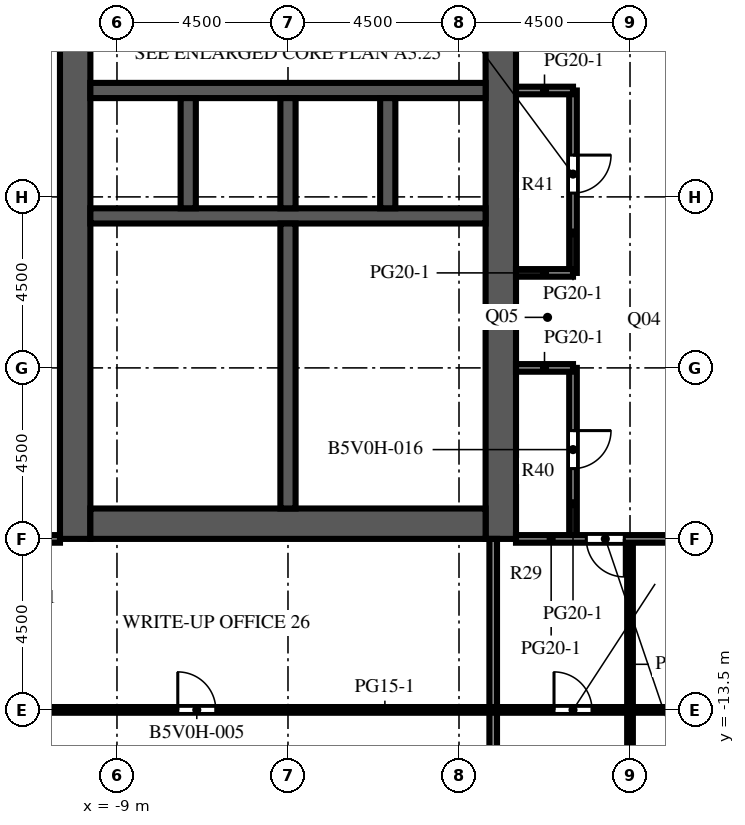
"""IFC4 building model, lengths in metres.
Left out: names, types, materials, properties, quantities, classifications, styles, units other than length and angle.
Written with IfcOpenShell. Run it as: python <this file> out.ifc"""

import sys

from ifc_helpers import new_model, si_unit, direction, frame, frame_2d, origin, place, context, subcontext, project, spatial, rectangle, extrude, element, fill, save


model = new_model("IFC4")
c1 = context("Model", 3, precision=1e-05, world=origin(), true_north=direction((0.0, 1.0)))
c2 = subcontext(c1, "Body", "Model", "MODEL_VIEW")
j1 = project(units=[si_unit("LENGTHUNIT", "METRE"), si_unit("PLANEANGLEUNIT", "RADIAN")], contexts=[c1])
p1 = place(None, origin())
s1 = spatial("IfcSite", under=j1, at=p1, CompositionType="ELEMENT")
p2 = place(p1, origin())
s2 = spatial("IfcBuilding", under=s1, at=p2, CompositionType="ELEMENT")
p3 = place(p2, frame((0.0, 0.0, 156.8)))
s3 = spatial("IfcBuildingStorey", under=s2, at=p3, CompositionType="ELEMENT", Elevation=156.8)
p4 = place(p3, frame((-10.1, -9.0, 0.0), z_axis=(0.0, 0.0, 1.0), x_axis=(0.0, 1.0, 0.0)))
e1 = element("IfcWall", 1, at=p4, inside=s3, PredefinedType="SHEAR", context=c2, shape_type="SweptSolid", body=[
    extrude(rectangle(XDim=27.5, YDim=0.8, at=frame_2d((13.75, 0.0))), origin(), (0.0, 0.0, 1.0), 4.1),
])
p5 = place(p4, frame((12.55, 0.0, 0.0)))
e2 = element("IfcOpeningElement", 2, at=p5, cuts=e1, PredefinedType="OPENING", context=c2, shape_type="SweptSolid", body=[
    extrude(rectangle(XDim=2.4, YDim=2.4, at=frame_2d((1.2, 1.2))), frame((0.0, 0.41, 0.0), z_axis=(0.0, -1.0, 0.0), x_axis=(1.0, 0.0, 0.0)), (0.0, 0.0, 1.0), 0.82),
])
p6 = place(p4, frame((6.825, 0.0, 0.0)))
e3 = element("IfcOpeningElement", 3, at=p6, cuts=e1, PredefinedType="OPENING", context=c2, shape_type="SweptSolid", body=[
    extrude(rectangle(XDim=1.2, YDim=2.1, at=frame_2d((0.6, 1.05))), frame((0.0, 0.41, 0.0), z_axis=(0.0, -1.0, 0.0), x_axis=(1.0, 0.0, 0.0)), (0.0, 0.0, 1.0), 0.82),
])
p7 = place(p4, frame((19.475, 0.0, 0.0)))
e4 = element("IfcOpeningElement", 4, at=p7, cuts=e1, PredefinedType="OPENING", context=c2, shape_type="SweptSolid", body=[
    extrude(rectangle(XDim=1.2, YDim=2.1, at=frame_2d((0.6, 1.05))), frame((0.0, 0.41, 0.0), z_axis=(0.0, -1.0, 0.0), x_axis=(1.0, 0.0, 0.0)), (0.0, 0.0, 1.0), 0.82),
])
p8 = place(p3, frame((1.1, -9.0, 0.0), z_axis=(0.0, 0.0, 1.0), x_axis=(0.0, 1.0, 0.0)))
e5 = element("IfcWall", 5, at=p8, inside=s3, PredefinedType="SHEAR", context=c2, shape_type="SweptSolid", body=[
    extrude(rectangle(XDim=27.5, YDim=0.8, at=frame_2d((13.75, 0.0))), origin(), (0.0, 0.0, 1.0), 4.1),
])
p9 = place(p8, frame((12.55, 0.0, 0.0)))
e6 = element("IfcOpeningElement", 6, at=p9, cuts=e5, PredefinedType="OPENING", context=c2, shape_type="SweptSolid", body=[
    extrude(rectangle(XDim=2.4, YDim=2.4, at=frame_2d((1.2, 1.2))), frame((0.0, 0.41, 0.0), z_axis=(0.0, -1.0, 0.0), x_axis=(1.0, 0.0, 0.0)), (0.0, 0.0, 1.0), 0.82),
])
p10 = place(p8, frame((5.45, 0.0, 0.0)))
e7 = element("IfcOpeningElement", 7, at=p10, cuts=e5, PredefinedType="OPENING", context=c2, shape_type="SweptSolid", body=[
    extrude(rectangle(XDim=1.2, YDim=2.1, at=frame_2d((0.6, 1.05))), frame((0.0, 0.41, 0.0), z_axis=(0.0, -1.0, 0.0), x_axis=(1.0, 0.0, 0.0)), (0.0, 0.0, 1.0), 0.82),
])
p11 = place(p8, frame((19.45, 0.0, 0.0)))
e8 = element("IfcOpeningElement", 8, at=p11, cuts=e5, PredefinedType="OPENING", context=c2, shape_type="SweptSolid", body=[
    extrude(rectangle(XDim=1.0, YDim=2.1, at=frame_2d((0.5, 1.05))), frame((0.0, 0.41, 0.0), z_axis=(0.0, -1.0, 0.0), x_axis=(1.0, 0.0, 0.0)), (0.0, 0.0, 1.0), 0.82),
])
p12 = place(p8, frame((21.137, 0.0, 0.0)))
e9 = element("IfcOpeningElement", 9, at=p12, cuts=e5, PredefinedType="OPENING", context=c2, shape_type="SweptSolid", body=[
    extrude(rectangle(XDim=1.0, YDim=2.1, at=frame_2d((0.5, 1.05))), frame((0.0, 0.41, 0.0), z_axis=(0.0, -1.0, 0.0), x_axis=(1.0, 0.0, 0.0)), (0.0, 0.0, 1.0), 0.82),
])
p13 = place(p8, frame((23.2, 0.0, 0.0)))
e10 = element("IfcOpeningElement", 10, at=p13, cuts=e5, PredefinedType="OPENING", context=c2, shape_type="SweptSolid", body=[
    extrude(rectangle(XDim=1.0, YDim=2.1, at=frame_2d((0.5, 1.05))), frame((0.0, 0.41, 0.0), z_axis=(0.0, -1.0, 0.0), x_axis=(1.0, 0.0, 0.0)), (0.0, 0.0, 1.0), 0.82),
])
p14 = place(p8, frame((25.262, 0.0, 0.0)))
e11 = element("IfcOpeningElement", 11, at=p14, cuts=e5, PredefinedType="OPENING", context=c2, shape_type="SweptSolid", body=[
    extrude(rectangle(XDim=1.0, YDim=2.1, at=frame_2d((0.5, 1.05))), frame((0.0, 0.41, 0.0), z_axis=(0.0, -1.0, 0.0), x_axis=(1.0, 0.0, 0.0)), (0.0, 0.0, 1.0), 0.82),
])
p15 = place(p3, frame((-9.7, -8.6, 0.0), z_axis=(0.0, 0.0, 1.0), x_axis=(1.0, 0.0, 0.0)))
e12 = element("IfcWall", 12, at=p15, inside=s3, PredefinedType="SHEAR", context=c2, shape_type="SweptSolid", body=[
    extrude(rectangle(XDim=10.4, YDim=0.8, at=frame_2d((5.2, 0.0))), origin(), (0.0, 0.0, 1.0), 4.1),
])
p16 = place(p3, frame((-9.7, -0.5, 0.0), z_axis=(0.0, 0.0, 1.0), x_axis=(1.0, 0.0, 0.0)))
e13 = element("IfcWall", 13, at=p16, inside=s3, PredefinedType="SHEAR", context=c2, shape_type="SweptSolid", body=[
    extrude(rectangle(XDim=10.4, YDim=0.4, at=frame_2d((5.2, 0.0))), origin(), (0.0, 0.0, 1.0), 4.1),
])
p17 = place(p3, frame((-9.7, 2.8, 0.0), z_axis=(0.0, 0.0, 1.0), x_axis=(1.0, 0.0, 0.0)))
e14 = element("IfcWall", 14, at=p17, inside=s3, PredefinedType="SHEAR", context=c2, shape_type="SweptSolid", body=[
    extrude(rectangle(XDim=10.4, YDim=0.4, at=frame_2d((5.2, 0.0))), origin(), (0.0, 0.0, 1.0), 4.1),
])
p18 = place(p17, frame((0.738, 0.0, 0.0)))
e15 = element("IfcOpeningElement", 15, at=p18, cuts=e14, PredefinedType="OPENING", context=c2, shape_type="SweptSolid", body=[
    extrude(rectangle(XDim=1.1, YDim=2.1, at=frame_2d((0.55, 1.05))), frame((0.0, 0.21, 0.0), z_axis=(0.0, -1.0, 0.0), x_axis=(1.0, 0.0, 0.0)), (0.0, 0.0, 1.0), 0.42),
])
p19 = place(p17, frame((3.337, 0.0, 0.0)))
e16 = element("IfcOpeningElement", 16, at=p19, cuts=e14, PredefinedType="OPENING", context=c2, shape_type="SweptSolid", body=[
    extrude(rectangle(XDim=1.1, YDim=2.1, at=frame_2d((0.55, 1.05))), frame((0.0, 0.21, 0.0), z_axis=(0.0, -1.0, 0.0), x_axis=(1.0, 0.0, 0.0)), (0.0, 0.0, 1.0), 0.42),
])
p20 = place(p17, frame((6.012, 0.0, 0.0)))
e17 = element("IfcOpeningElement", 17, at=p20, cuts=e14, PredefinedType="OPENING", context=c2, shape_type="SweptSolid", body=[
    extrude(rectangle(XDim=1.0, YDim=2.1, at=frame_2d((0.5, 1.05))), frame((0.0, 0.21, 0.0), z_axis=(0.0, -1.0, 0.0), x_axis=(1.0, 0.0, 0.0)), (0.0, 0.0, 1.0), 0.42),
])
p21 = place(p17, frame((8.613, 0.0, 0.0)))
e18 = element("IfcOpeningElement", 18, at=p21, cuts=e14, PredefinedType="OPENING", context=c2, shape_type="SweptSolid", body=[
    extrude(rectangle(XDim=1.0, YDim=2.1, at=frame_2d((0.5, 1.05))), frame((0.0, 0.21, 0.0), z_axis=(0.0, -1.0, 0.0), x_axis=(1.0, 0.0, 0.0)), (0.0, 0.0, 1.0), 0.42),
])
for number, where, z_axis, x_axis in (
    (19, (-7.125, -0.3, 0.0), (0.0, 0.0, 1.0), (0.0, 1.0, 0.0)),
    (20, (-4.5, -0.3, 0.0), (0.0, 0.0, 1.0), (0.0, 1.0, 0.0)),
    (21, (-1.875, -0.3, 0.0), (0.0, 0.0, 1.0), (0.0, 1.0, 0.0)),
):
    element("IfcWall", number, at=place(p3, frame(where, z_axis=z_axis, x_axis=x_axis)), inside=s3, PredefinedType="SHEAR", context=c2, shape_type="SweptSolid", body=[
        extrude(rectangle(XDim=2.9, YDim=0.4, at=frame_2d((1.45, 0.0))), origin(), (0.0, 0.0, 1.0), 4.1),
    ])
p22 = place(p3, frame((-4.5, -8.2, 0.0), z_axis=(0.0, 0.0, 1.0), x_axis=(0.0, 1.0, 0.0)))
e22 = element("IfcWall", 22, at=p22, inside=s3, PredefinedType="SHEAR", context=c2, shape_type="SweptSolid", body=[
    extrude(rectangle(XDim=7.5, YDim=0.4, at=frame_2d((3.75, 0.0))), origin(), (0.0, 0.0, 1.0), 4.1),
])
p23 = place(p3, frame((-0.8, -5.2, 0.0), z_axis=(0.0, 0.0, 1.0), x_axis=(1.0, 0.0, 0.0)))
e23 = element("IfcWall", 23, at=p23, inside=s3, PredefinedType="PARTITIONING", context=c2, shape_type="SweptSolid", body=[
    extrude(rectangle(XDim=1.5, YDim=0.1, at=frame_2d((0.75, 0.0))), origin(), (0.0, 0.0, 1.0), 3.65),
])
p24 = place(p23, frame((0.25, 0.0, 0.0)))
e24 = element("IfcOpeningElement", 24, at=p24, cuts=e23, PredefinedType="OPENING", context=c2, shape_type="SweptSolid", body=[
    extrude(rectangle(XDim=1.0, YDim=2.1, at=frame_2d((0.5, 1.05))), frame((0.0, 0.06, 0.0), z_axis=(0.0, -1.0, 0.0), x_axis=(1.0, 0.0, 0.0)), (0.0, 0.0, 1.0), 0.12),
])
p25 = place(p3, frame((-0.8, -5.2, 0.0), z_axis=(0.0, 0.0, 1.0), x_axis=(0.0, 1.0, 0.0)))
e25 = element("IfcWall", 25, at=p25, inside=s3, PredefinedType="PARTITIONING", context=c2, shape_type="SweptSolid", body=[
    extrude(rectangle(XDim=2.25, YDim=0.1, at=frame_2d((1.125, 0.0))), origin(), (0.0, 0.0, 1.0), 3.65),
])
p26 = place(p25, frame((0.625, 0.0, 0.0)))
e26 = element("IfcOpeningElement", 26, at=p26, cuts=e25, PredefinedType="OPENING", context=c2, shape_type="SweptSolid", body=[
    extrude(rectangle(XDim=1.0, YDim=2.1, at=frame_2d((0.5, 1.05))), frame((0.0, 0.06, 0.0), z_axis=(0.0, -1.0, 0.0), x_axis=(1.0, 0.0, 0.0)), (0.0, 0.0, 1.0), 0.12),
])
p27 = place(p3, frame((-0.8, -2.95, 0.0), z_axis=(0.0, 0.0, 1.0), x_axis=(0.0, 1.0, 0.0)))
e27 = element("IfcWall", 27, at=p27, inside=s3, PredefinedType="PARTITIONING", context=c2, shape_type="SweptSolid", body=[
    extrude(rectangle(XDim=2.25, YDim=0.1, at=frame_2d((1.125, 0.0))), origin(), (0.0, 0.0, 1.0), 3.65),
])
p28 = place(p27, frame((0.625, 0.0, 0.0)))
e28 = element("IfcOpeningElement", 28, at=p28, cuts=e27, PredefinedType="OPENING", context=c2, shape_type="SweptSolid", body=[
    extrude(rectangle(XDim=1.0, YDim=2.1, at=frame_2d((0.5, 1.05))), frame((0.0, 0.06, 0.0), z_axis=(0.0, -1.0, 0.0), x_axis=(1.0, 0.0, 0.0)), (0.0, 0.0, 1.0), 0.12),
])
for number, where, z_axis, x_axis in (
    (29, (-4.3, -5.2, 0.0), (0.0, 0.0, 1.0), (1.0, 0.0, 0.0)),
    (30, (-4.3, -2.95, 0.0), (0.0, 0.0, 1.0), (1.0, 0.0, 0.0)),
):
    element("IfcWall", number, at=place(p3, frame(where, z_axis=z_axis, x_axis=x_axis)), inside=s3, PredefinedType="PARTITIONING", context=c2, shape_type="SweptSolid", body=[
        extrude(rectangle(XDim=3.5, YDim=0.1, at=frame_2d((1.75, 0.0))), origin(), (0.0, 0.0, 1.0), 3.65),
    ])
p29 = place(p3, frame((0.9, -26.85, 0.0), z_axis=(0.0, 0.0, 1.0), x_axis=(0.0, 1.0, 0.0)))
e31 = element("IfcWall", 31, at=p29, inside=s3, PredefinedType="PARTITIONING", context=c2, shape_type="SweptSolid", body=[
    extrude(rectangle(XDim=17.85, YDim=0.2, at=frame_2d((8.925, 0.0))), origin(), (0.0, 0.0, 1.0), 3.65),
])
p30 = place(p3, frame((3.0, -9.0, 0.0), z_axis=(0.0, 0.0, 1.0), x_axis=(0.0, 1.0, 0.0)))
e32 = element("IfcWall", 32, at=p30, inside=s3, PredefinedType="PARTITIONING", context=c2, shape_type="SweptSolid", body=[
    extrude(rectangle(XDim=4.5, YDim=0.2, at=frame_2d((2.25, 0.0))), origin(), (0.0, 0.0, 1.0), 3.65),
])
p31 = place(p30, frame((1.85, 0.0, 0.0)))
e33 = element("IfcOpeningElement", 33, at=p31, cuts=e32, PredefinedType="OPENING", context=c2, shape_type="SweptSolid", body=[
    extrude(rectangle(XDim=1.0, YDim=2.1, at=frame_2d((0.5, 1.05))), frame((0.0, 0.11, 0.0), z_axis=(0.0, -1.0, 0.0), x_axis=(1.0, 0.0, 0.0)), (0.0, 0.0, 1.0), 0.22),
])
p32 = place(p3, frame((3.0, -2.0, 0.0), z_axis=(0.0, 0.0, 1.0), x_axis=(0.0, 1.0, 0.0)))
e34 = element("IfcWall", 34, at=p32, inside=s3, PredefinedType="PARTITIONING", context=c2, shape_type="SweptSolid", body=[
    extrude(rectangle(XDim=4.8, YDim=0.2, at=frame_2d((2.4, 0.0))), origin(), (0.0, 0.0, 1.0), 3.65),
])
p33 = place(p32, frame((2.1, 0.0, 0.0)))
e35 = element("IfcOpeningElement", 35, at=p33, cuts=e34, PredefinedType="OPENING", context=c2, shape_type="SweptSolid", body=[
    extrude(rectangle(XDim=1.0, YDim=2.1, at=frame_2d((0.5, 1.05))), frame((0.0, 0.11, 0.0), z_axis=(0.0, -1.0, 0.0), x_axis=(1.0, 0.0, 0.0)), (0.0, 0.0, 1.0), 0.22),
])
p34 = place(p3, frame((4.5, -9.0, 0.0), z_axis=(0.0, 0.0, 1.0), x_axis=(0.0, -1.0, 0.0)))
e36 = element("IfcWall", 36, at=p34, inside=s3, PredefinedType="PARTITIONING", context=c2, shape_type="SweptSolid", body=[
    extrude(rectangle(XDim=13.0, YDim=0.15, at=frame_2d((6.5, 0.0))), origin(), (0.0, 0.0, 1.0), 3.65),
])
p35 = place(p34, frame((6.6, 0.0, 0.0)))
e37 = element("IfcOpeningElement", 37, at=p35, cuts=e36, PredefinedType="OPENING", context=c2, shape_type="SweptSolid", body=[
    extrude(rectangle(XDim=1.0, YDim=2.1, at=frame_2d((0.5, 1.05))), frame((0.0, 0.085, 0.0), z_axis=(0.0, -1.0, 0.0), x_axis=(1.0, 0.0, 0.0)), (0.0, 0.0, 1.0), 0.17),
])
p36 = place(p3, frame((21.0, -13.5, 0.0), z_axis=(0.0, 0.0, 1.0), x_axis=(-1.0, 0.0, 0.0)))
e38 = element("IfcWall", 38, at=p36, inside=s3, PredefinedType="PARTITIONING", context=c2, shape_type="SweptSolid", body=[
    extrude(rectangle(XDim=34.5, YDim=0.15, at=frame_2d((17.25, 0.0))), origin(), (0.0, 0.0, 1.0), 3.65),
])
p37 = place(p36, frame((27.4, 0.0, 0.0)))
e39 = element("IfcOpeningElement", 39, at=p37, cuts=e38, PredefinedType="OPENING", context=c2, shape_type="SweptSolid", body=[
    extrude(rectangle(XDim=1.0, YDim=2.1, at=frame_2d((0.5, 1.05))), frame((0.0, 0.085, 0.0), z_axis=(0.0, -1.0, 0.0), x_axis=(1.0, 0.0, 0.0)), (0.0, 0.0, 1.0), 0.17),
])
p38 = place(p36, frame((17.5, 0.0, 0.0)))
e40 = element("IfcOpeningElement", 40, at=p38, cuts=e38, PredefinedType="OPENING", context=c2, shape_type="SweptSolid", body=[
    extrude(rectangle(XDim=1.0, YDim=2.1, at=frame_2d((0.5, 1.05))), frame((0.0, 0.085, 0.0), z_axis=(0.0, -1.0, 0.0), x_axis=(1.0, 0.0, 0.0)), (0.0, 0.0, 1.0), 0.17),
])
p39 = place(p36, frame((10.4, 0.0, 0.0)))
e41 = element("IfcOpeningElement", 41, at=p39, cuts=e38, PredefinedType="OPENING", context=c2, shape_type="SweptSolid", body=[
    extrude(rectangle(XDim=1.0, YDim=2.1, at=frame_2d((0.5, 1.05))), frame((0.0, 0.085, 0.0), z_axis=(0.0, -1.0, 0.0), x_axis=(1.0, 0.0, 0.0)), (0.0, 0.0, 1.0), 0.17),
])
p40 = place(p36, frame((3.65, 0.0, 0.0)))
e42 = element("IfcOpeningElement", 42, at=p40, cuts=e38, PredefinedType="OPENING", context=c2, shape_type="SweptSolid", body=[
    extrude(rectangle(XDim=1.0, YDim=2.1, at=frame_2d((0.5, 1.05))), frame((0.0, 0.085, 0.0), z_axis=(0.0, -1.0, 0.0), x_axis=(1.0, 0.0, 0.0)), (0.0, 0.0, 1.0), 0.17),
])
p41 = place(p3, frame((-10.5, -9.0, 0.0), z_axis=(0.0, 0.0, 1.0), x_axis=(-1.0, 0.0, 0.0)))
e43 = element("IfcWall", 43, at=p41, inside=s3, PredefinedType="PARTITIONING", context=c2, shape_type="SweptSolid", body=[
    extrude(rectangle(XDim=3.0, YDim=0.2, at=frame_2d((1.5, 0.0))), origin(), (0.0, 0.0, 1.0), 3.65),
])
p42 = place(p41, frame((0.9, 0.0, 0.0)))
e44 = element("IfcOpeningElement", 44, at=p42, cuts=e43, PredefinedType="OPENING", context=c2, shape_type="SweptSolid", body=[
    extrude(rectangle(XDim=1.0, YDim=2.1, at=frame_2d((0.5, 1.05))), frame((0.0, 0.11, 0.0), z_axis=(0.0, -1.0, 0.0), x_axis=(1.0, 0.0, 0.0)), (0.0, 0.0, 1.0), 0.22),
])
p43 = place(p3, frame((6.0, -9.0, 0.0), z_axis=(0.0, 0.0, 1.0), x_axis=(-1.0, 0.0, 0.0)))
e45 = element("IfcWall", 45, at=p43, inside=s3, PredefinedType="PARTITIONING", context=c2, shape_type="SweptSolid", body=[
    extrude(rectangle(XDim=4.5, YDim=0.2, at=frame_2d((2.25, 0.0))), origin(), (0.0, 0.0, 1.0), 3.65),
])
p44 = place(p43, frame((1.65, 0.0, 0.0)))
e46 = element("IfcOpeningElement", 46, at=p44, cuts=e45, PredefinedType="OPENING", context=c2, shape_type="SweptSolid", body=[
    extrude(rectangle(XDim=1.0, YDim=2.1, at=frame_2d((0.5, 1.05))), frame((0.0, 0.11, 0.0), z_axis=(0.0, -1.0, 0.0), x_axis=(1.0, 0.0, 0.0)), (0.0, 0.0, 1.0), 0.22),
])
for number, where, z_axis, x_axis in (
    (47, (1.5, -4.5, 0.0), (0.0, 0.0, 1.0), (1.0, 0.0, 0.0)),
    (48, (1.5, -2.0, 0.0), (0.0, 0.0, 1.0), (1.0, 0.0, 0.0)),
    (49, (1.5, 2.8, 0.0), (0.0, 0.0, 1.0), (1.0, 0.0, 0.0)),
):
    element("IfcWall", number, at=place(p3, frame(where, z_axis=z_axis, x_axis=x_axis)), inside=s3, PredefinedType="PARTITIONING", context=c2, shape_type="SweptSolid", body=[
        extrude(rectangle(XDim=1.5, YDim=0.2, at=frame_2d((0.75, 0.0))), origin(), (0.0, 0.0, 1.0), 3.65),
    ])
p45 = place(p18, origin())
e50 = element("IfcDoor", 50, at=p45, inside=s3, OperationType="DOUBLE_DOOR_SLIDING", PredefinedType="DOOR", context=c2, shape_type="SweptSolid", body=[
    extrude(rectangle(XDim=1.1, YDim=2.1, at=frame_2d((0.55, 1.05))), frame((0.0, 0.025, 0.0), z_axis=(0.0, -1.0, 0.0), x_axis=(1.0, 0.0, 0.0)), (0.0, 0.0, 1.0), 0.05),
])
fill(e15, e50)
p46 = place(p19, origin())
e51 = element("IfcDoor", 51, at=p46, inside=s3, OperationType="DOUBLE_DOOR_SLIDING", PredefinedType="DOOR", context=c2, shape_type="SweptSolid", body=[
    extrude(rectangle(XDim=1.1, YDim=2.1, at=frame_2d((0.55, 1.05))), frame((0.0, 0.025, 0.0), z_axis=(0.0, -1.0, 0.0), x_axis=(1.0, 0.0, 0.0)), (0.0, 0.0, 1.0), 0.05),
])
fill(e16, e51)
p47 = place(p5, origin())
e52 = element("IfcDoor", 52, at=p47, inside=s3, OperationType="DOUBLE_DOOR_DOUBLE_SWING", PredefinedType="DOOR", context=c2, shape_type="SweptSolid", body=[
    extrude(rectangle(XDim=2.4, YDim=2.4, at=frame_2d((1.2, 1.2))), frame((0.0, 0.025, 0.0), z_axis=(0.0, -1.0, 0.0), x_axis=(1.0, 0.0, 0.0)), (0.0, 0.0, 1.0), 0.05),
])
fill(e2, e52)
p48 = place(p9, origin())
e53 = element("IfcDoor", 53, at=p48, inside=s3, OperationType="DOUBLE_DOOR_DOUBLE_SWING", PredefinedType="DOOR", context=c2, shape_type="SweptSolid", body=[
    extrude(rectangle(XDim=2.4, YDim=2.4, at=frame_2d((1.2, 1.2))), frame((0.0, 0.025, 0.0), z_axis=(0.0, -1.0, 0.0), x_axis=(1.0, 0.0, 0.0)), (0.0, 0.0, 1.0), 0.05),
])
fill(e6, e53)
p49 = place(p6, origin())
e54 = element("IfcDoor", 54, at=p49, inside=s3, OperationType="SINGLE_SWING_LEFT", PredefinedType="DOOR", context=c2, shape_type="SweptSolid", body=[
    extrude(rectangle(XDim=1.2, YDim=2.1, at=frame_2d((0.6, 1.05))), frame((0.0, 0.025, 0.0), z_axis=(0.0, -1.0, 0.0), x_axis=(1.0, 0.0, 0.0)), (0.0, 0.0, 1.0), 0.05),
])
fill(e3, e54)
p50 = place(p20, origin())
e55 = element("IfcDoor", 55, at=p50, inside=s3, OperationType="SINGLE_SWING_LEFT", PredefinedType="DOOR", context=c2, shape_type="SweptSolid", body=[
    extrude(rectangle(XDim=1.0, YDim=2.1, at=frame_2d((0.5, 1.05))), frame((0.0, 0.025, 0.0), z_axis=(0.0, -1.0, 0.0), x_axis=(1.0, 0.0, 0.0)), (0.0, 0.0, 1.0), 0.05),
])
fill(e17, e55)
p51 = place(p21, origin())
e56 = element("IfcDoor", 56, at=p51, inside=s3, OperationType="SINGLE_SWING_RIGHT", PredefinedType="DOOR", context=c2, shape_type="SweptSolid", body=[
    extrude(rectangle(XDim=1.0, YDim=2.1, at=frame_2d((0.5, 1.05))), frame((0.0, 0.025, 0.0), z_axis=(0.0, -1.0, 0.0), x_axis=(1.0, 0.0, 0.0)), (0.0, 0.0, 1.0), 0.05),
])
fill(e18, e56)
p52 = place(p10, origin())
e57 = element("IfcDoor", 57, at=p52, inside=s3, OperationType="SINGLE_SWING_LEFT", PredefinedType="DOOR", context=c2, shape_type="SweptSolid", body=[
    extrude(rectangle(XDim=1.2, YDim=2.1, at=frame_2d((0.6, 1.05))), frame((0.0, 0.375, 0.0), z_axis=(0.0, -1.0, 0.0), x_axis=(1.0, 0.0, 0.0)), (0.0, 0.0, 1.0), 0.05),
])
fill(e7, e57)
p53 = place(p24, origin())
e58 = element("IfcDoor", 58, at=p53, inside=s3, OperationType="SINGLE_SWING_RIGHT", PredefinedType="DOOR", context=c2, shape_type="SweptSolid", body=[
    extrude(rectangle(XDim=1.0, YDim=2.1, at=frame_2d((0.5, 1.05))), frame((0.0, 0.025, 0.0), z_axis=(0.0, -1.0, 0.0), x_axis=(1.0, 0.0, 0.0)), (0.0, 0.0, 1.0), 0.05),
])
fill(e24, e58)
p54 = place(p26, origin())
e59 = element("IfcDoor", 59, at=p54, inside=s3, OperationType="SINGLE_SWING_LEFT", PredefinedType="DOOR", context=c2, shape_type="SweptSolid", body=[
    extrude(rectangle(XDim=1.0, YDim=2.1, at=frame_2d((0.5, 1.05))), frame((0.0, 0.025, 0.0), z_axis=(0.0, -1.0, 0.0), x_axis=(1.0, 0.0, 0.0)), (0.0, 0.0, 1.0), 0.05),
])
fill(e26, e59)
p55 = place(p28, origin())
e60 = element("IfcDoor", 60, at=p55, inside=s3, OperationType="SINGLE_SWING_RIGHT", PredefinedType="DOOR", context=c2, shape_type="SweptSolid", body=[
    extrude(rectangle(XDim=1.0, YDim=2.1, at=frame_2d((0.5, 1.05))), frame((0.0, 0.025, 0.0), z_axis=(0.0, -1.0, 0.0), x_axis=(1.0, 0.0, 0.0)), (0.0, 0.0, 1.0), 0.05),
])
fill(e28, e60)
p56 = place(p37, origin())
e61 = element("IfcDoor", 61, at=p56, inside=s3, OperationType="SINGLE_SWING_RIGHT", PredefinedType="DOOR", context=c2, shape_type="SweptSolid", body=[
    extrude(rectangle(XDim=1.0, YDim=2.1, at=frame_2d((0.5, 1.05))), frame((0.0, 0.025, 0.0), z_axis=(0.0, -1.0, 0.0), x_axis=(1.0, 0.0, 0.0)), (0.0, 0.0, 1.0), 0.05),
])
fill(e39, e61)
p57 = place(p38, origin())
e62 = element("IfcDoor", 62, at=p57, inside=s3, OperationType="SINGLE_SWING_RIGHT", PredefinedType="DOOR", context=c2, shape_type="SweptSolid", body=[
    extrude(rectangle(XDim=1.0, YDim=2.1, at=frame_2d((0.5, 1.05))), frame((0.0, 0.025, 0.0), z_axis=(0.0, -1.0, 0.0), x_axis=(1.0, 0.0, 0.0)), (0.0, 0.0, 1.0), 0.05),
])
fill(e40, e62)
p58 = place(p44, origin())
e63 = element("IfcDoor", 63, at=p58, inside=s3, OperationType="SINGLE_SWING_LEFT", PredefinedType="DOOR", context=c2, shape_type="SweptSolid", body=[
    extrude(rectangle(XDim=1.0, YDim=2.1, at=frame_2d((0.5, 1.05))), frame((0.0, 0.025, 0.0), z_axis=(0.0, -1.0, 0.0), x_axis=(1.0, 0.0, 0.0)), (0.0, 0.0, 1.0), 0.05),
])
fill(e46, e63)
p59 = place(p31, origin())
e64 = element("IfcDoor", 64, at=p59, inside=s3, OperationType="SINGLE_SWING_RIGHT", PredefinedType="DOOR", context=c2, shape_type="SweptSolid", body=[
    extrude(rectangle(XDim=1.0, YDim=2.1, at=frame_2d((0.5, 1.05))), frame((0.0, 0.025, 0.0), z_axis=(0.0, -1.0, 0.0), x_axis=(1.0, 0.0, 0.0)), (0.0, 0.0, 1.0), 0.05),
])
fill(e33, e64)
p60 = place(p33, origin())
e65 = element("IfcDoor", 65, at=p60, inside=s3, OperationType="SINGLE_SWING_RIGHT", PredefinedType="DOOR", context=c2, shape_type="SweptSolid", body=[
    extrude(rectangle(XDim=1.0, YDim=2.1, at=frame_2d((0.5, 1.05))), frame((0.0, 0.025, 0.0), z_axis=(0.0, -1.0, 0.0), x_axis=(1.0, 0.0, 0.0)), (0.0, 0.0, 1.0), 0.05),
])
fill(e35, e65)
save(model, sys.argv[1])
